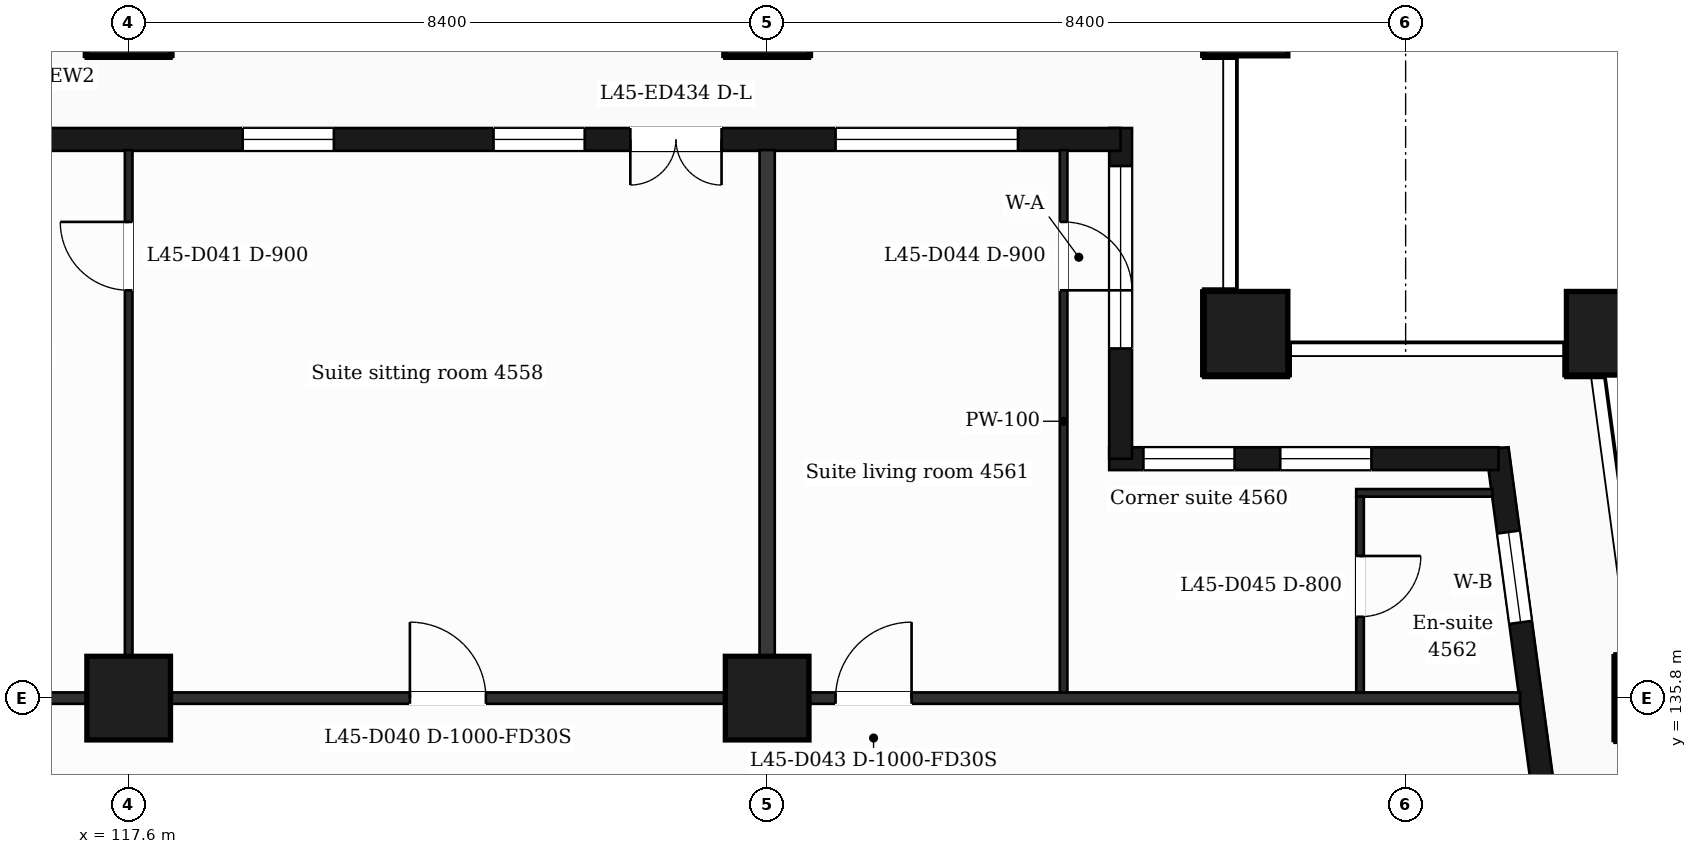
"""IFC4 building model, lengths in metres.
Left out: names, types, materials, properties, quantities, classifications, styles, units other than length and angle.
Written with IfcOpenShell. Run it as: python <this file> out.ifc"""

import sys

from ifc_helpers import new_model, si_unit, direction, frame, frame_2d, origin, origin_2d, place, context, subcontext, project, spatial, rectangle, extrude, element, fill, save


model = new_model("IFC4")
c1 = context("Model", 3, precision=1e-05, world=origin(), true_north=direction((0.0, 1.0)))
c2 = subcontext(c1, "Body", "Model", "MODEL_VIEW")
j1 = project(units=[si_unit("LENGTHUNIT", "METRE"), si_unit("PLANEANGLEUNIT", "RADIAN")], contexts=[c1])
p1 = place(None, origin())
s1 = spatial("IfcSite", under=j1, at=p1, CompositionType="ELEMENT")
p2 = place(p1, origin())
s2 = spatial("IfcBuilding", under=s1, at=p2, CompositionType="ELEMENT")
p3 = place(p2, frame((0.0, 0.0, 188.5)))
s3 = spatial("IfcBuildingStorey", under=s2, at=p3, CompositionType="ELEMENT", Elevation=188.5)
for number, where, z_axis, x_axis in (
    (1, (132.3, 140.6, 0.0), (0.0, 0.0, 1.0), (1.0, 0.0, 0.0)),
    (2, (137.065, 140.6, 0.0), (0.0, 0.0, 1.0), (1.0, 0.0, 0.0)),
    (3, (117.6, 135.8, 0.0), (0.0, 0.0, 1.0), (1.0, 0.0, 0.0)),
    (4, (126.0, 135.8, 0.0), (0.0, 0.0, 1.0), (1.0, 0.0, 0.0)),
    (5, (137.711, 135.8, 0.0), (0.0, 0.0, 1.0), (1.0, 0.0, 0.0)),
    (6, (117.6, 144.8, 0.0), (0.0, 0.0, 1.0), (1.0, 0.0, 0.0)),
    (7, (126.0, 144.8, 0.0), (0.0, 0.0, 1.0), (1.0, 0.0, 0.0)),
    (8, (132.3, 144.8, 0.0), (0.0, 0.0, 1.0), (1.0, 0.0, 0.0)),
):
    element("IfcColumn", number, at=place(p3, frame(where, z_axis=z_axis, x_axis=x_axis)), inside=s3, PredefinedType="COLUMN", context=c2, shape_type="SweptSolid", body=[
        extrude(rectangle(XDim=1.1, YDim=1.1, at=origin_2d()), origin(), (0.0, 0.0, 1.0), 3.7),
    ])
p4 = place(p3, frame((136.504, 132.4, 0.0), z_axis=(0.0, 0.0, 1.0), x_axis=(-0.133399697462, 0.99106231929, 0.0)))
e9 = element("IfcWall", 9, at=p4, inside=s3, PredefinedType="SOLIDWALL", context=c2, shape_type="SweptSolid", body=[
    extrude(rectangle(XDim=6.74, YDim=0.3, at=frame_2d((3.37, 0.0))), origin(), (0.0, 0.0, 1.0), 3.25),
])
p5 = place(p4, frame((1.115, 0.0, 0.0)))
e10 = element("IfcOpeningElement", 10, at=p5, cuts=e9, PredefinedType="OPENING", context=c2, shape_type="SweptSolid", body=[
    extrude(rectangle(XDim=1.2, YDim=2.4, at=frame_2d((0.6, 1.2))), frame((0.0, 0.16, 0.0), z_axis=(0.0, -1.0, 0.0), x_axis=(1.0, 0.0, 0.0)), (0.0, 0.0, 1.0), 0.32),
])
p6 = place(p4, frame((4.436, 0.0, 0.9)))
e11 = element("IfcOpeningElement", 11, at=p6, cuts=e9, PredefinedType="OPENING", context=c2, shape_type="SweptSolid", body=[
    extrude(rectangle(XDim=1.2, YDim=2.1, at=frame_2d((0.6, 1.05))), frame((0.0, 0.16, 0.0), z_axis=(0.0, -1.0, 0.0), x_axis=(1.0, 0.0, 0.0)), (0.0, 0.0, 1.0), 0.32),
])
p7 = place(p3, frame((135.623, 138.95, 0.0), z_axis=(0.0, 0.0, 1.0), x_axis=(-1.0, 0.0, 0.0)))
e12 = element("IfcWall", 12, at=p7, inside=s3, PredefinedType="SOLIDWALL", context=c2, shape_type="SweptSolid", body=[
    extrude(rectangle(XDim=5.123, YDim=0.3, at=frame_2d((2.561, 0.0))), origin(), (0.0, 0.0, 1.0), 3.25),
])
p8 = place(p7, frame((1.673, 0.0, 0.9)))
e13 = element("IfcOpeningElement", 13, at=p8, cuts=e12, PredefinedType="OPENING", context=c2, shape_type="SweptSolid", body=[
    extrude(rectangle(XDim=1.2, YDim=2.1, at=frame_2d((0.6, 1.05))), frame((0.0, 0.16, 0.0), z_axis=(0.0, -1.0, 0.0), x_axis=(1.0, 0.0, 0.0)), (0.0, 0.0, 1.0), 0.32),
])
p9 = place(p7, frame((3.473, 0.0, 0.9)))
e14 = element("IfcOpeningElement", 14, at=p9, cuts=e12, PredefinedType="OPENING", context=c2, shape_type="SweptSolid", body=[
    extrude(rectangle(XDim=1.2, YDim=2.1, at=frame_2d((0.6, 1.05))), frame((0.0, 0.16, 0.0), z_axis=(0.0, -1.0, 0.0), x_axis=(1.0, 0.0, 0.0)), (0.0, 0.0, 1.0), 0.32),
])
p10 = place(p3, frame((130.65, 138.95, 0.0), z_axis=(0.0, 0.0, 1.0), x_axis=(0.0, 1.0, 0.0)))
e15 = element("IfcWall", 15, at=p10, inside=s3, PredefinedType="SOLIDWALL", context=c2, shape_type="SweptSolid", body=[
    extrude(rectangle(XDim=4.35, YDim=0.3, at=frame_2d((2.175, 0.0))), origin(), (0.0, 0.0, 1.0), 3.25),
])
p11 = place(p10, frame((1.45, 0.0, 0.9)))
e16 = element("IfcOpeningElement", 16, at=p11, cuts=e15, PredefinedType="OPENING", context=c2, shape_type="SweptSolid", body=[
    extrude(rectangle(XDim=2.4, YDim=2.1, at=frame_2d((1.2, 1.05))), frame((0.0, 0.16, 0.0), z_axis=(0.0, -1.0, 0.0), x_axis=(1.0, 0.0, 0.0)), (0.0, 0.0, 1.0), 0.32),
])
p12 = place(p3, frame((130.65, 143.15, 0.0), z_axis=(0.0, 0.0, 1.0), x_axis=(-1.0, 0.0, 0.0)))
e17 = element("IfcWall", 17, at=p12, inside=s3, PredefinedType="SOLIDWALL", context=c2, shape_type="SweptSolid", body=[
    extrude(rectangle(XDim=14.25, YDim=0.3, at=frame_2d((7.125, 0.0))), origin(), (0.0, 0.0, 1.0), 3.25),
])
p13 = place(p12, frame((1.35, 0.0, 0.9)))
e18 = element("IfcOpeningElement", 18, at=p13, cuts=e17, PredefinedType="OPENING", context=c2, shape_type="SweptSolid", body=[
    extrude(rectangle(XDim=2.4, YDim=2.1, at=frame_2d((1.2, 1.05))), frame((0.0, 0.16, 0.0), z_axis=(0.0, -1.0, 0.0), x_axis=(1.0, 0.0, 0.0)), (0.0, 0.0, 1.0), 0.32),
])
p14 = place(p12, frame((5.25, 0.0, 0.0)))
e19 = element("IfcOpeningElement", 19, at=p14, cuts=e17, PredefinedType="OPENING", context=c2, shape_type="SweptSolid", body=[
    extrude(rectangle(XDim=1.2, YDim=2.4, at=frame_2d((0.6, 1.2))), frame((0.0, 0.16, 0.0), z_axis=(0.0, -1.0, 0.0), x_axis=(1.0, 0.0, 0.0)), (0.0, 0.0, 1.0), 0.32),
])
p15 = place(p12, frame((7.05, 0.0, 0.9)))
e20 = element("IfcOpeningElement", 20, at=p15, cuts=e17, PredefinedType="OPENING", context=c2, shape_type="SweptSolid", body=[
    extrude(rectangle(XDim=1.2, YDim=2.1, at=frame_2d((0.6, 1.05))), frame((0.0, 0.16, 0.0), z_axis=(0.0, -1.0, 0.0), x_axis=(1.0, 0.0, 0.0)), (0.0, 0.0, 1.0), 0.32),
])
p16 = place(p12, frame((10.35, 0.0, 0.9)))
e21 = element("IfcOpeningElement", 21, at=p16, cuts=e17, PredefinedType="OPENING", context=c2, shape_type="SweptSolid", body=[
    extrude(rectangle(XDim=1.2, YDim=2.1, at=frame_2d((0.6, 1.05))), frame((0.0, 0.16, 0.0), z_axis=(0.0, -1.0, 0.0), x_axis=(1.0, 0.0, 0.0)), (0.0, 0.0, 1.0), 0.32),
])
p17 = place(p3, frame((90.895, 135.8, 0.0), z_axis=(0.0, 0.0, 1.0), x_axis=(1.0, 0.0, 0.0)))
e22 = element("IfcWall", 22, at=p17, inside=s3, PredefinedType="PARTITIONING", context=c2, shape_type="SweptSolid", body=[
    extrude(rectangle(XDim=45.011, YDim=0.15, at=frame_2d((22.505, 0.0))), origin(), (0.0, 0.0, 1.0), 3.25),
])
p18 = place(p17, frame((6.906, 0.0, 0.0)))
e23 = element("IfcOpeningElement", 23, at=p18, cuts=e22, PredefinedType="OPENING", context=c2, shape_type="SweptSolid", body=[
    extrude(rectangle(XDim=1.0, YDim=2.1, at=frame_2d((0.5, 1.05))), frame((0.0, 0.085, 0.0), z_axis=(0.0, -1.0, 0.0), x_axis=(1.0, 0.0, 0.0)), (0.0, 0.0, 1.0), 0.17),
])
p19 = place(p17, frame((10.705, 0.0, 0.0)))
e24 = element("IfcOpeningElement", 24, at=p19, cuts=e22, PredefinedType="OPENING", context=c2, shape_type="SweptSolid", body=[
    extrude(rectangle(XDim=0.95, YDim=2.1, at=frame_2d((0.475, 1.05))), frame((0.0, 0.085, 0.0), z_axis=(0.0, -1.0, 0.0), x_axis=(1.0, 0.0, 0.0)), (0.0, 0.0, 1.0), 0.17),
])
p20 = place(p17, frame((16.555, 0.0, 0.0)))
e25 = element("IfcOpeningElement", 25, at=p20, cuts=e22, PredefinedType="OPENING", context=c2, shape_type="SweptSolid", body=[
    extrude(rectangle(XDim=0.95, YDim=2.1, at=frame_2d((0.475, 1.05))), frame((0.0, 0.085, 0.0), z_axis=(0.0, -1.0, 0.0), x_axis=(1.0, 0.0, 0.0)), (0.0, 0.0, 1.0), 0.17),
])
p21 = place(p17, frame((21.095, 0.0, 0.0)))
e26 = element("IfcOpeningElement", 26, at=p21, cuts=e22, PredefinedType="OPENING", context=c2, shape_type="SweptSolid", body=[
    extrude(rectangle(XDim=1.0, YDim=2.1, at=frame_2d((0.5, 1.05))), frame((0.0, 0.085, 0.0), z_axis=(0.0, -1.0, 0.0), x_axis=(1.0, 0.0, 0.0)), (0.0, 0.0, 1.0), 0.17),
])
p22 = place(p17, frame((30.406, 0.0, 0.0)))
e27 = element("IfcOpeningElement", 27, at=p22, cuts=e22, PredefinedType="OPENING", context=c2, shape_type="SweptSolid", body=[
    extrude(rectangle(XDim=1.0, YDim=2.1, at=frame_2d((0.5, 1.05))), frame((0.0, 0.085, 0.0), z_axis=(0.0, -1.0, 0.0), x_axis=(1.0, 0.0, 0.0)), (0.0, 0.0, 1.0), 0.17),
])
p23 = place(p17, frame((36.005, 0.0, 0.0)))
e28 = element("IfcOpeningElement", 28, at=p23, cuts=e22, PredefinedType="OPENING", context=c2, shape_type="SweptSolid", body=[
    extrude(rectangle(XDim=1.0, YDim=2.1, at=frame_2d((0.5, 1.05))), frame((0.0, 0.085, 0.0), z_axis=(0.0, -1.0, 0.0), x_axis=(1.0, 0.0, 0.0)), (0.0, 0.0, 1.0), 0.17),
])
p24 = place(p3, frame((133.75, 138.5, 0.0), z_axis=(0.0, 0.0, 1.0), x_axis=(1.0, 0.0, 0.0)))
e29 = element("IfcWall", 29, at=p24, inside=s3, PredefinedType="PARTITIONING", context=c2, shape_type="SweptSolid", body=[
    extrude(rectangle(XDim=1.792, YDim=0.1, at=frame_2d((0.896, 0.0))), origin(), (0.0, 0.0, 1.0), 3.25),
])
p25 = place(p3, frame((117.6, 135.875, 0.0), z_axis=(0.0, 0.0, 1.0), x_axis=(0.0, 1.0, 0.0)))
e30 = element("IfcWall", 30, at=p25, inside=s3, PredefinedType="PARTITIONING", context=c2, shape_type="SweptSolid", body=[
    extrude(rectangle(XDim=7.135, YDim=0.1, at=frame_2d((3.567, 0.0))), origin(), (0.0, 0.0, 1.0), 3.25),
])
p26 = place(p25, frame((5.29, 0.0, 0.0)))
e31 = element("IfcOpeningElement", 31, at=p26, cuts=e30, PredefinedType="OPENING", context=c2, shape_type="SweptSolid", body=[
    extrude(rectangle(XDim=0.9, YDim=2.1, at=frame_2d((0.45, 1.05))), frame((0.0, 0.06, 0.0), z_axis=(0.0, -1.0, 0.0), x_axis=(1.0, 0.0, 0.0)), (0.0, 0.0, 1.0), 0.12),
])
p27 = place(p3, frame((126.0, 135.875, 0.0), z_axis=(0.0, 0.0, 1.0), x_axis=(0.0, 1.0, 0.0)))
e32 = element("IfcWall", 32, at=p27, inside=s3, PredefinedType="PARTITIONING", context=c2, shape_type="SweptSolid", body=[
    extrude(rectangle(XDim=7.135, YDim=0.2, at=frame_2d((3.567, 0.0))), origin(), (0.0, 0.0, 1.0), 3.25),
])
p28 = place(p3, frame((129.9, 135.875, 0.0), z_axis=(0.0, 0.0, 1.0), x_axis=(0.0, 1.0, 0.0)))
e33 = element("IfcWall", 33, at=p28, inside=s3, PredefinedType="PARTITIONING", context=c2, shape_type="SweptSolid", body=[
    extrude(rectangle(XDim=7.135, YDim=0.1, at=frame_2d((3.567, 0.0))), origin(), (0.0, 0.0, 1.0), 3.25),
])
p29 = place(p28, frame((5.29, 0.0, 0.0)))
e34 = element("IfcOpeningElement", 34, at=p29, cuts=e33, PredefinedType="OPENING", context=c2, shape_type="SweptSolid", body=[
    extrude(rectangle(XDim=0.9, YDim=2.1, at=frame_2d((0.45, 1.05))), frame((0.0, 0.06, 0.0), z_axis=(0.0, -1.0, 0.0), x_axis=(1.0, 0.0, 0.0)), (0.0, 0.0, 1.0), 0.12),
])
p30 = place(p3, frame((133.8, 135.875, 0.0), z_axis=(0.0, 0.0, 1.0), x_axis=(0.0, 1.0, 0.0)))
e35 = element("IfcWall", 35, at=p30, inside=s3, PredefinedType="PARTITIONING", context=c2, shape_type="SweptSolid", body=[
    extrude(rectangle(XDim=2.575, YDim=0.1, at=frame_2d((1.288, 0.0))), origin(), (0.0, 0.0, 1.0), 3.25),
])
p31 = place(p30, frame((0.995, 0.0, 0.0)))
e36 = element("IfcOpeningElement", 36, at=p31, cuts=e35, PredefinedType="OPENING", context=c2, shape_type="SweptSolid", body=[
    extrude(rectangle(XDim=0.8, YDim=2.1, at=frame_2d((0.4, 1.05))), frame((0.0, 0.06, 0.0), z_axis=(0.0, -1.0, 0.0), x_axis=(1.0, 0.0, 0.0)), (0.0, 0.0, 1.0), 0.12),
])
p32 = place(p6, origin())
e37 = element("IfcWindow", 37, at=p32, inside=s3, PartitioningType="SINGLE_PANEL", PredefinedType="WINDOW", context=c2, shape_type="SweptSolid", body=[
    extrude(rectangle(XDim=1.2, YDim=2.1, at=frame_2d((0.6, 1.05))), frame((0.0, 0.03, 0.0), z_axis=(0.0, -1.0, 0.0), x_axis=(1.0, 0.0, 0.0)), (0.0, 0.0, 1.0), 0.06),
])
fill(e11, e37)
p33 = place(p8, origin())
e38 = element("IfcWindow", 38, at=p33, inside=s3, PartitioningType="SINGLE_PANEL", PredefinedType="WINDOW", context=c2, shape_type="SweptSolid", body=[
    extrude(rectangle(XDim=1.2, YDim=2.1, at=frame_2d((0.6, 1.05))), frame((0.0, 0.03, 0.0), z_axis=(0.0, -1.0, 0.0), x_axis=(1.0, 0.0, 0.0)), (0.0, 0.0, 1.0), 0.06),
])
fill(e13, e38)
p34 = place(p9, origin())
e39 = element("IfcWindow", 39, at=p34, inside=s3, PartitioningType="SINGLE_PANEL", PredefinedType="WINDOW", context=c2, shape_type="SweptSolid", body=[
    extrude(rectangle(XDim=1.2, YDim=2.1, at=frame_2d((0.6, 1.05))), frame((0.0, 0.03, 0.0), z_axis=(0.0, -1.0, 0.0), x_axis=(1.0, 0.0, 0.0)), (0.0, 0.0, 1.0), 0.06),
])
fill(e14, e39)
p35 = place(p11, origin())
e40 = element("IfcWindow", 40, at=p35, inside=s3, PartitioningType="SINGLE_PANEL", PredefinedType="WINDOW", context=c2, shape_type="SweptSolid", body=[
    extrude(rectangle(XDim=2.4, YDim=2.1, at=frame_2d((1.2, 1.05))), frame((0.0, 0.03, 0.0), z_axis=(0.0, -1.0, 0.0), x_axis=(1.0, 0.0, 0.0)), (0.0, 0.0, 1.0), 0.06),
])
fill(e16, e40)
p36 = place(p13, origin())
e41 = element("IfcWindow", 41, at=p36, inside=s3, PartitioningType="SINGLE_PANEL", PredefinedType="WINDOW", context=c2, shape_type="SweptSolid", body=[
    extrude(rectangle(XDim=2.4, YDim=2.1, at=frame_2d((1.2, 1.05))), frame((0.0, 0.03, 0.0), z_axis=(0.0, -1.0, 0.0), x_axis=(1.0, 0.0, 0.0)), (0.0, 0.0, 1.0), 0.06),
])
fill(e18, e41)
p37 = place(p14, origin())
e42 = element("IfcDoor", 42, at=p37, inside=s3, OperationType="DOUBLE_DOOR_SINGLE_SWING", PredefinedType="DOOR", context=c2, shape_type="SweptSolid", body=[
    extrude(rectangle(XDim=1.2, YDim=2.4, at=frame_2d((0.6, 1.2))), frame((0.0, 0.025, 0.0), z_axis=(0.0, -1.0, 0.0), x_axis=(1.0, 0.0, 0.0)), (0.0, 0.0, 1.0), 0.05),
])
fill(e19, e42)
p38 = place(p15, origin())
e43 = element("IfcWindow", 43, at=p38, inside=s3, PartitioningType="SINGLE_PANEL", PredefinedType="WINDOW", context=c2, shape_type="SweptSolid", body=[
    extrude(rectangle(XDim=1.2, YDim=2.1, at=frame_2d((0.6, 1.05))), frame((0.0, 0.03, 0.0), z_axis=(0.0, -1.0, 0.0), x_axis=(1.0, 0.0, 0.0)), (0.0, 0.0, 1.0), 0.06),
])
fill(e20, e43)
p39 = place(p16, origin())
e44 = element("IfcWindow", 44, at=p39, inside=s3, PartitioningType="SINGLE_PANEL", PredefinedType="WINDOW", context=c2, shape_type="SweptSolid", body=[
    extrude(rectangle(XDim=1.2, YDim=2.1, at=frame_2d((0.6, 1.05))), frame((0.0, 0.03, 0.0), z_axis=(0.0, -1.0, 0.0), x_axis=(1.0, 0.0, 0.0)), (0.0, 0.0, 1.0), 0.06),
])
fill(e21, e44)
p40 = place(p22, origin())
e45 = element("IfcDoor", 45, at=p40, inside=s3, OperationType="SINGLE_SWING_LEFT", PredefinedType="DOOR", context=c2, shape_type="SweptSolid", body=[
    extrude(rectangle(XDim=1.0, YDim=2.1, at=frame_2d((0.5, 1.05))), frame((0.0, 0.025, 0.0), z_axis=(0.0, -1.0, 0.0), x_axis=(1.0, 0.0, 0.0)), (0.0, 0.0, 1.0), 0.05),
])
fill(e27, e45)
p41 = place(p26, origin())
e46 = element("IfcDoor", 46, at=p41, inside=s3, OperationType="SINGLE_SWING_RIGHT", PredefinedType="DOOR", context=c2, shape_type="SweptSolid", body=[
    extrude(rectangle(XDim=0.9, YDim=2.1, at=frame_2d((0.45, 1.05))), frame((0.0, 0.025, 0.0), z_axis=(0.0, -1.0, 0.0), x_axis=(1.0, 0.0, 0.0)), (0.0, 0.0, 1.0), 0.05),
])
fill(e31, e46)
p42 = place(p23, origin())
e47 = element("IfcDoor", 47, at=p42, inside=s3, OperationType="SINGLE_SWING_RIGHT", PredefinedType="DOOR", context=c2, shape_type="SweptSolid", body=[
    extrude(rectangle(XDim=1.0, YDim=2.1, at=frame_2d((0.5, 1.05))), frame((0.0, 0.025, 0.0), z_axis=(0.0, -1.0, 0.0), x_axis=(1.0, 0.0, 0.0)), (0.0, 0.0, 1.0), 0.05),
])
fill(e28, e47)
p43 = place(p29, origin())
e48 = element("IfcDoor", 48, at=p43, inside=s3, OperationType="SINGLE_SWING_LEFT", PredefinedType="DOOR", context=c2, shape_type="SweptSolid", body=[
    extrude(rectangle(XDim=0.9, YDim=2.1, at=frame_2d((0.45, 1.05))), frame((0.0, 0.025, 0.0), z_axis=(0.0, -1.0, 0.0), x_axis=(1.0, 0.0, 0.0)), (0.0, 0.0, 1.0), 0.05),
])
fill(e34, e48)
p44 = place(p31, origin())
e49 = element("IfcDoor", 49, at=p44, inside=s3, OperationType="SINGLE_SWING_RIGHT", PredefinedType="DOOR", context=c2, shape_type="SweptSolid", body=[
    extrude(rectangle(XDim=0.8, YDim=2.1, at=frame_2d((0.4, 1.05))), frame((0.0, 0.025, 0.0), z_axis=(0.0, -1.0, 0.0), x_axis=(1.0, 0.0, 0.0)), (0.0, 0.0, 1.0), 0.05),
])
fill(e36, e49)
save(model, sys.argv[1])
